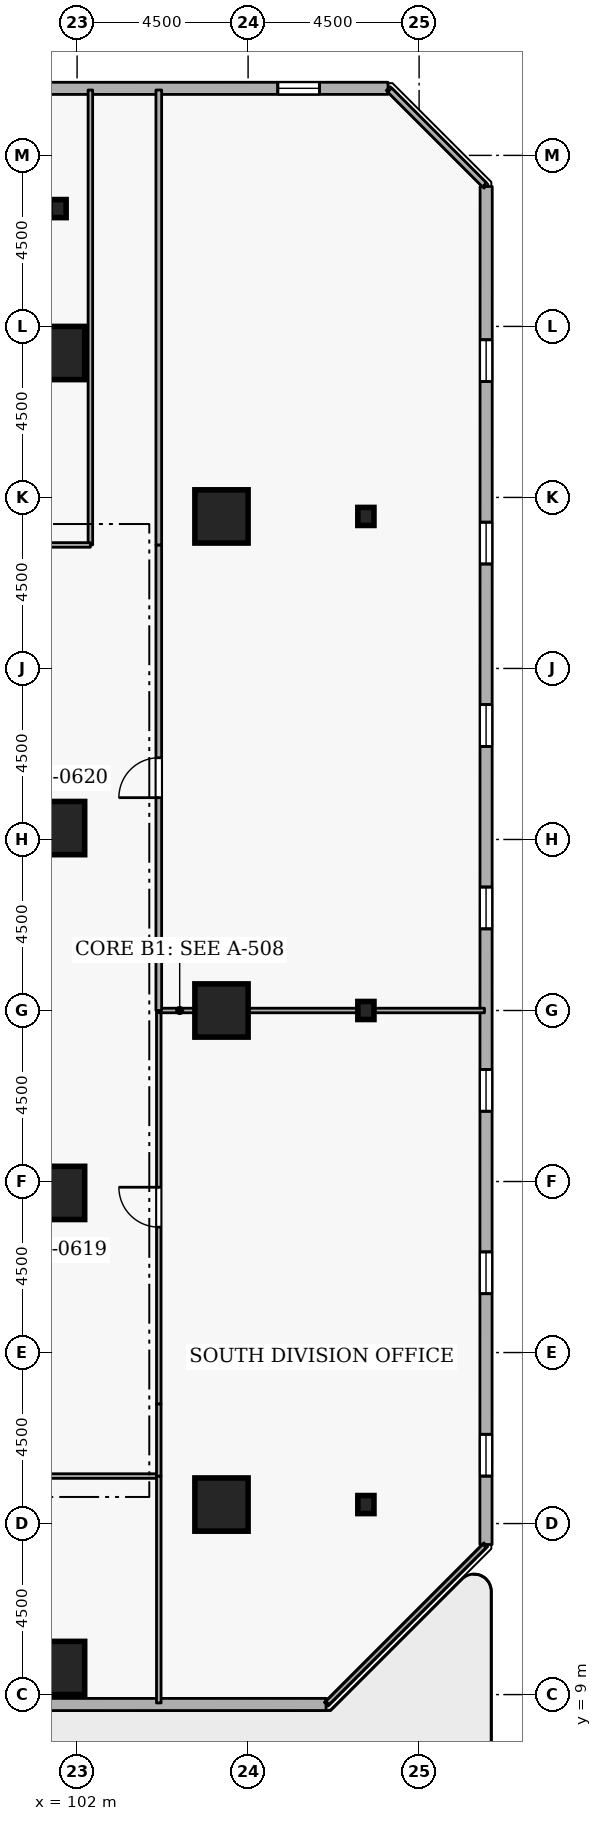
"""IFC4 building model, lengths in metres.
Left out: names, types, materials, properties, quantities, classifications, styles, units other than length and angle.
Written with IfcOpenShell. Run it as: python <this file> out.ifc"""

import sys

from ifc_helpers import new_model, si_unit, direction, frame, frame_2d, origin, origin_2d, place, context, subcontext, project, spatial, rectangle, i_section, extrude, element, fill, save


model = new_model("IFC4")
c1 = context("Model", 3, precision=1e-05, world=origin(), true_north=direction((0.0, 1.0)))
c2 = subcontext(c1, "Body", "Model", "MODEL_VIEW")
j1 = project(units=[si_unit("LENGTHUNIT", "METRE"), si_unit("PLANEANGLEUNIT", "RADIAN")], contexts=[c1])
p1 = place(None, origin())
s1 = spatial("IfcSite", under=j1, at=p1, CompositionType="ELEMENT")
p2 = place(p1, origin())
s2 = spatial("IfcBuilding", under=s1, at=p2, CompositionType="ELEMENT")
p3 = place(p2, frame((0.0, 0.0, 49.5)))
s3 = spatial("IfcBuildingStorey", under=s2, at=p3, CompositionType="ELEMENT", Elevation=49.5)
for number, where, z_axis, x_axis in (
    (1, (105.8, 14.0, 0.0), (0.0, 0.0, 1.0), (1.0, 0.0, 0.0)),
    (2, (105.8, 27.0, 0.0), (0.0, 0.0, 1.0), (1.0, 0.0, 0.0)),
    (3, (105.8, 40.0, 0.0), (0.0, 0.0, 1.0), (1.0, 0.0, 0.0)),
    (4, (101.5, 44.3, 0.0), (0.0, 0.0, 1.0), (1.0, 0.0, 0.0)),
    (5, (101.5, 9.7, 0.0), (0.0, 0.0, 1.0), (1.0, 0.0, 0.0)),
    (6, (101.5, 22.2, 0.0), (0.0, 0.0, 1.0), (1.0, 0.0, 0.0)),
    (7, (101.5, 31.8, 0.0), (0.0, 0.0, 1.0), (1.0, 0.0, 0.0)),
):
    element("IfcColumn", number, at=place(p3, frame(where, z_axis=z_axis, x_axis=x_axis)), inside=s3, PredefinedType="COLUMN", context=c2, shape_type="SweptSolid", body=[
        extrude(rectangle(XDim=1.4, YDim=1.4, at=origin_2d()), origin(), (0.0, 0.0, 1.0), 4.2),
    ])
for number, where, z_axis, x_axis in (
    (8, (109.6, 14.0, 0.0), (0.0, 0.0, 1.0), (1.0, 0.0, 0.0)),
    (9, (109.6, 27.0, 0.0), (0.0, 0.0, 1.0), (1.0, 0.0, 0.0)),
    (10, (109.6, 40.0, 0.0), (0.0, 0.0, 1.0), (1.0, 0.0, 0.0)),
    (11, (101.5, 48.1, 0.0), (0.0, 0.0, 1.0), (1.0, 0.0, 0.0)),
):
    element("IfcColumn", number, at=place(p3, frame(where, z_axis=z_axis, x_axis=x_axis)), inside=s3, PredefinedType="COLUMN", context=c2, shape_type="SweptSolid", body=[
        extrude(i_section(OverallWidth=0.424, OverallDepth=0.475, WebThickness=0.048, FlangeThickness=0.077, FilletRadius=0.015, at=origin_2d()), origin(), (0.0, 0.0, 1.0), 4.2),
    ])
p4 = place(p3, frame((72.819, 8.735, 0.0), z_axis=(0.0, 0.0, 1.0), x_axis=(0.999999988703, 0.000150313265, 0.0)))
e12 = element("IfcWall", 12, at=p4, inside=s3, PredefinedType="STANDARD", context=c2, shape_type="SweptSolid", body=[
    extrude(rectangle(XDim=35.733, YDim=0.32, at=frame_2d((17.866, 0.0))), origin(), (0.0, 0.0, 1.0), 3.3),
])
p5 = place(p4, frame((19.591, 0.0, 0.0)))
e13 = element("IfcOpeningElement", 13, at=p5, cuts=e12, PredefinedType="OPENING", context=c2, shape_type="SweptSolid", body=[
    extrude(rectangle(XDim=1.15, YDim=2.1, at=frame_2d((0.575, 1.05))), frame((0.0, 0.17, 0.0), z_axis=(0.0, -1.0, 0.0), x_axis=(1.0, 0.0, 0.0)), (0.0, 0.0, 1.0), 0.34),
])
p6 = place(p4, frame((6.6, 0.0, 0.72)))
e14 = element("IfcOpeningElement", 14, at=p6, cuts=e12, PredefinedType="OPENING", context=c2, shape_type="SweptSolid", body=[
    extrude(rectangle(XDim=1.1, YDim=1.8, at=frame_2d((0.55, 0.9))), frame((0.0, 0.17, 0.0), z_axis=(0.0, -1.0, 0.0), x_axis=(1.0, 0.0, 0.0)), (0.0, 0.0, 1.0), 0.34),
])
p7 = place(p4, frame((11.4, 0.0, 0.72)))
e15 = element("IfcOpeningElement", 15, at=p7, cuts=e12, PredefinedType="OPENING", context=c2, shape_type="SweptSolid", body=[
    extrude(rectangle(XDim=1.1, YDim=1.8, at=frame_2d((0.55, 0.9))), frame((0.0, 0.17, 0.0), z_axis=(0.0, -1.0, 0.0), x_axis=(1.0, 0.0, 0.0)), (0.0, 0.0, 1.0), 0.34),
])
p8 = place(p4, frame((25.8, 0.0, 0.72)))
e16 = element("IfcOpeningElement", 16, at=p8, cuts=e12, PredefinedType="OPENING", context=c2, shape_type="SweptSolid", body=[
    extrude(rectangle(XDim=1.1, YDim=1.8, at=frame_2d((0.55, 0.9))), frame((0.0, 0.17, 0.0), z_axis=(0.0, -1.0, 0.0), x_axis=(1.0, 0.0, 0.0)), (0.0, 0.0, 1.0), 0.34),
])
p9 = place(p3, frame((112.76, 12.948, 0.0), z_axis=(0.0, 0.0, 1.0), x_axis=(0.000150313265, 0.999999988703, 0.0)))
e17 = element("IfcWall", 17, at=p9, inside=s3, PredefinedType="STANDARD", context=c2, shape_type="SweptSolid", body=[
    extrude(rectangle(XDim=35.733, YDim=0.32, at=frame_2d((17.866, 0.0))), origin(), (0.0, 0.0, 1.0), 3.3),
])
p10 = place(p9, frame((1.8, 0.0, 0.72)))
e18 = element("IfcOpeningElement", 18, at=p10, cuts=e17, PredefinedType="OPENING", context=c2, shape_type="SweptSolid", body=[
    extrude(rectangle(XDim=1.1, YDim=1.8, at=frame_2d((0.55, 0.9))), frame((0.0, 0.17, 0.0), z_axis=(0.0, -1.0, 0.0), x_axis=(1.0, 0.0, 0.0)), (0.0, 0.0, 1.0), 0.34),
])
p11 = place(p9, frame((6.6, 0.0, 0.72)))
e19 = element("IfcOpeningElement", 19, at=p11, cuts=e17, PredefinedType="OPENING", context=c2, shape_type="SweptSolid", body=[
    extrude(rectangle(XDim=1.1, YDim=1.8, at=frame_2d((0.55, 0.9))), frame((0.0, 0.17, 0.0), z_axis=(0.0, -1.0, 0.0), x_axis=(1.0, 0.0, 0.0)), (0.0, 0.0, 1.0), 0.34),
])
p12 = place(p9, frame((11.4, 0.0, 0.72)))
e20 = element("IfcOpeningElement", 20, at=p12, cuts=e17, PredefinedType="OPENING", context=c2, shape_type="SweptSolid", body=[
    extrude(rectangle(XDim=1.1, YDim=1.8, at=frame_2d((0.55, 0.9))), frame((0.0, 0.17, 0.0), z_axis=(0.0, -1.0, 0.0), x_axis=(1.0, 0.0, 0.0)), (0.0, 0.0, 1.0), 0.34),
])
p13 = place(p9, frame((16.2, 0.0, 0.72)))
e21 = element("IfcOpeningElement", 21, at=p13, cuts=e17, PredefinedType="OPENING", context=c2, shape_type="SweptSolid", body=[
    extrude(rectangle(XDim=1.1, YDim=1.8, at=frame_2d((0.55, 0.9))), frame((0.0, 0.17, 0.0), z_axis=(0.0, -1.0, 0.0), x_axis=(1.0, 0.0, 0.0)), (0.0, 0.0, 1.0), 0.34),
])
p14 = place(p9, frame((21.0, 0.0, 0.72)))
e22 = element("IfcOpeningElement", 22, at=p14, cuts=e17, PredefinedType="OPENING", context=c2, shape_type="SweptSolid", body=[
    extrude(rectangle(XDim=1.1, YDim=1.8, at=frame_2d((0.55, 0.9))), frame((0.0, 0.17, 0.0), z_axis=(0.0, -1.0, 0.0), x_axis=(1.0, 0.0, 0.0)), (0.0, 0.0, 1.0), 0.34),
])
p15 = place(p9, frame((25.8, 0.0, 0.72)))
e23 = element("IfcOpeningElement", 23, at=p15, cuts=e17, PredefinedType="OPENING", context=c2, shape_type="SweptSolid", body=[
    extrude(rectangle(XDim=1.1, YDim=1.8, at=frame_2d((0.55, 0.9))), frame((0.0, 0.17, 0.0), z_axis=(0.0, -1.0, 0.0), x_axis=(1.0, 0.0, 0.0)), (0.0, 0.0, 1.0), 0.34),
])
p16 = place(p9, frame((30.6, 0.0, 0.72)))
e24 = element("IfcOpeningElement", 24, at=p16, cuts=e17, PredefinedType="OPENING", context=c2, shape_type="SweptSolid", body=[
    extrude(rectangle(XDim=1.1, YDim=1.8, at=frame_2d((0.55, 0.9))), frame((0.0, 0.17, 0.0), z_axis=(0.0, -1.0, 0.0), x_axis=(1.0, 0.0, 0.0)), (0.0, 0.0, 1.0), 0.34),
])
p17 = place(p3, frame((110.181, 51.265, 0.0), z_axis=(0.0, 0.0, 1.0), x_axis=(-0.999999988703, -0.000150313265, 0.0)))
e25 = element("IfcWall", 25, at=p17, inside=s3, PredefinedType="STANDARD", context=c2, shape_type="SweptSolid", body=[
    extrude(rectangle(XDim=35.733, YDim=0.32, at=frame_2d((17.866, 0.0))), origin(), (0.0, 0.0, 1.0), 3.3),
])
p18 = place(p17, frame((1.8, 0.0, 0.72)))
e26 = element("IfcOpeningElement", 26, at=p18, cuts=e25, PredefinedType="OPENING", context=c2, shape_type="SweptSolid", body=[
    extrude(rectangle(XDim=1.1, YDim=1.8, at=frame_2d((0.55, 0.9))), frame((0.0, 0.17, 0.0), z_axis=(0.0, -1.0, 0.0), x_axis=(1.0, 0.0, 0.0)), (0.0, 0.0, 1.0), 0.34),
])
p19 = place(p17, frame((11.4, 0.0, 0.72)))
e27 = element("IfcOpeningElement", 27, at=p19, cuts=e25, PredefinedType="OPENING", context=c2, shape_type="SweptSolid", body=[
    extrude(rectangle(XDim=1.1, YDim=1.8, at=frame_2d((0.55, 0.9))), frame((0.0, 0.17, 0.0), z_axis=(0.0, -1.0, 0.0), x_axis=(1.0, 0.0, 0.0)), (0.0, 0.0, 1.0), 0.34),
])
p20 = place(p17, frame((16.2, 0.0, 0.72)))
e28 = element("IfcOpeningElement", 28, at=p20, cuts=e25, PredefinedType="OPENING", context=c2, shape_type="SweptSolid", body=[
    extrude(rectangle(XDim=1.1, YDim=1.8, at=frame_2d((0.55, 0.9))), frame((0.0, 0.17, 0.0), z_axis=(0.0, -1.0, 0.0), x_axis=(1.0, 0.0, 0.0)), (0.0, 0.0, 1.0), 0.34),
])
p21 = place(p17, frame((25.8, 0.0, 0.72)))
e29 = element("IfcOpeningElement", 29, at=p21, cuts=e25, PredefinedType="OPENING", context=c2, shape_type="SweptSolid", body=[
    extrude(rectangle(XDim=1.1, YDim=1.8, at=frame_2d((0.55, 0.9))), frame((0.0, 0.17, 0.0), z_axis=(0.0, -1.0, 0.0), x_axis=(1.0, 0.0, 0.0)), (0.0, 0.0, 1.0), 0.34),
])
p22 = place(p17, frame((30.6, 0.0, 0.72)))
e30 = element("IfcOpeningElement", 30, at=p22, cuts=e25, PredefinedType="OPENING", context=c2, shape_type="SweptSolid", body=[
    extrude(rectangle(XDim=1.1, YDim=1.8, at=frame_2d((0.55, 0.9))), frame((0.0, 0.17, 0.0), z_axis=(0.0, -1.0, 0.0), x_axis=(1.0, 0.0, 0.0)), (0.0, 0.0, 1.0), 0.34),
])
p23 = place(p3, frame((94.8, 14.75, 0.0), z_axis=(0.0, 0.0, 1.0), x_axis=(1.0, 0.0, 0.0)))
e31 = element("IfcWall", 31, at=p23, inside=s3, PredefinedType="PARTITIONING", context=c2, shape_type="SweptSolid", body=[
    extrude(rectangle(XDim=9.35, YDim=0.12, at=frame_2d((4.675, 0.0))), origin(), (0.0, 0.0, 1.0), 3.94),
])
p24 = place(p23, frame((4.15, 0.0, 0.0)))
e32 = element("IfcOpeningElement", 32, at=p24, cuts=e31, PredefinedType="OPENING", context=c2, shape_type="SweptSolid", body=[
    extrude(rectangle(XDim=1.05, YDim=2.1, at=frame_2d((0.525, 1.05))), frame((0.0, 0.07, 0.0), z_axis=(0.0, -1.0, 0.0), x_axis=(1.0, 0.0, 0.0)), (0.0, 0.0, 1.0), 0.14),
])
p25 = place(p3, frame((104.15, 14.75, 0.0), z_axis=(0.0, 0.0, 1.0), x_axis=(0.0, -1.0, 0.0)))
e33 = element("IfcWall", 33, at=p25, inside=s3, PredefinedType="PARTITIONING", context=c2, shape_type="SweptSolid", body=[
    extrude(rectangle(XDim=5.97, YDim=0.12, at=frame_2d((2.985, 0.0))), origin(), (0.0, 0.0, 1.0), 3.94),
])
p26 = place(p3, frame((102.35, 51.22, 0.0), z_axis=(0.0, 0.0, 1.0), x_axis=(0.0, -1.0, 0.0)))
e34 = element("IfcWall", 34, at=p26, inside=s3, PredefinedType="PARTITIONING", context=c2, shape_type="SweptSolid", body=[
    extrude(rectangle(XDim=11.97, YDim=0.12, at=frame_2d((5.985, 0.0))), origin(), (0.0, 0.0, 1.0), 3.94),
])
p27 = place(p3, frame((102.35, 39.25, 0.0), z_axis=(0.0, 0.0, 1.0), x_axis=(-1.0, 0.0, 0.0)))
e35 = element("IfcWall", 35, at=p27, inside=s3, PredefinedType="PARTITIONING", context=c2, shape_type="SweptSolid", body=[
    extrude(rectangle(XDim=1.862, YDim=0.12, at=frame_2d((0.931, 0.0))), origin(), (0.0, 0.0, 1.0), 3.94),
])
p28 = place(p3, frame((104.15, 14.75, 0.0), z_axis=(0.0, 0.0, 1.0), x_axis=(0.0, 1.0, 0.0)))
e36 = element("IfcWall", 36, at=p28, inside=s3, PredefinedType="PARTITIONING", context=c2, shape_type="SweptSolid", body=[
    extrude(rectangle(XDim=1.9, YDim=0.12, at=frame_2d((0.95, 0.0))), origin(), (0.0, 0.0, 1.0), 3.94),
])
p29 = place(p3, frame((104.15, 16.65, 0.0), z_axis=(0.0, 0.0, 1.0), x_axis=(0.0, 1.0, 0.0)))
e37 = element("IfcWall", 37, at=p29, inside=s3, PredefinedType="PARTITIONING", context=c2, shape_type="SweptSolid", body=[
    extrude(rectangle(XDim=10.35, YDim=0.12, at=frame_2d((5.175, 0.0))), origin(), (0.0, 0.0, 1.0), 3.94),
])
p30 = place(p29, frame((4.65, 0.0, 0.0)))
e38 = element("IfcOpeningElement", 38, at=p30, cuts=e37, PredefinedType="OPENING", context=c2, shape_type="SweptSolid", body=[
    extrude(rectangle(XDim=1.05, YDim=2.1, at=frame_2d((0.525, 1.05))), frame((0.0, 0.07, 0.0), z_axis=(0.0, -1.0, 0.0), x_axis=(1.0, 0.0, 0.0)), (0.0, 0.0, 1.0), 0.14),
])
p31 = place(p3, frame((104.15, 27.0, 0.0), z_axis=(0.0, 0.0, 1.0), x_axis=(1.0, 0.0, 0.0)))
e39 = element("IfcWall", 39, at=p31, inside=s3, PredefinedType="PARTITIONING", context=c2, shape_type="SweptSolid", body=[
    extrude(rectangle(XDim=8.57, YDim=0.12, at=frame_2d((4.285, 0.0))), origin(), (0.0, 0.0, 1.0), 3.532),
])
p32 = place(p3, frame((112.72, 12.911, 0.0), z_axis=(0.0, 0.0, 1.0), x_axis=(-0.707106781187, -0.707106781187, 0.0)))
e40 = element("IfcWall", 40, at=p32, inside=s3, PredefinedType="PARTITIONING", context=c2, shape_type="SweptSolid", body=[
    extrude(rectangle(XDim=5.842, YDim=0.12, at=frame_2d((2.921, 0.0))), origin(), (0.0, 0.0, 1.0), 3.94),
])
p33 = place(p3, frame((104.15, 27.0, 0.0), z_axis=(0.0, 0.0, 1.0), x_axis=(0.0, 1.0, 0.0)))
e41 = element("IfcWall", 41, at=p33, inside=s3, PredefinedType="PARTITIONING", context=c2, shape_type="SweptSolid", body=[
    extrude(rectangle(XDim=12.25, YDim=0.15, at=frame_2d((6.125, 0.0))), origin(), (0.0, 0.0, 1.0), 3.94),
])
p34 = place(p33, frame((5.6, 0.0, 0.0)))
e42 = element("IfcOpeningElement", 42, at=p34, cuts=e41, PredefinedType="OPENING", context=c2, shape_type="SweptSolid", body=[
    extrude(rectangle(XDim=1.05, YDim=2.1, at=frame_2d((0.525, 1.05))), frame((0.0, 0.085, 0.0), z_axis=(0.0, -1.0, 0.0), x_axis=(1.0, 0.0, 0.0)), (0.0, 0.0, 1.0), 0.17),
])
p35 = place(p3, frame((104.15, 39.25, 0.0), z_axis=(0.0, 0.0, 1.0), x_axis=(0.0, 1.0, 0.0)))
e43 = element("IfcWall", 43, at=p35, inside=s3, PredefinedType="PARTITIONING", context=c2, shape_type="SweptSolid", body=[
    extrude(rectangle(XDim=11.97, YDim=0.15, at=frame_2d((5.985, 0.0))), origin(), (0.0, 0.0, 1.0), 3.94),
])
p36 = place(p3, frame((110.225, 51.22, 0.0), z_axis=(0.0, 0.0, 1.0), x_axis=(0.707106781187, -0.707106781187, 0.0)))
e44 = element("IfcWall", 44, at=p36, inside=s3, PredefinedType="PARTITIONING", context=c2, shape_type="SweptSolid", body=[
    extrude(rectangle(XDim=3.528, YDim=0.15, at=frame_2d((1.764, 0.0))), origin(), (0.0, 0.0, 1.0), 3.94),
])
p37 = place(p10, origin())
e45 = element("IfcWindow", 45, at=p37, inside=s3, PartitioningType="SINGLE_PANEL", PredefinedType="WINDOW", context=c2, shape_type="SweptSolid", body=[
    extrude(rectangle(XDim=1.1, YDim=1.8, at=frame_2d((0.55, 0.9))), frame((0.0, 0.03, 0.0), z_axis=(0.0, -1.0, 0.0), x_axis=(1.0, 0.0, 0.0)), (0.0, 0.0, 1.0), 0.06),
])
fill(e18, e45)
p38 = place(p11, origin())
e46 = element("IfcWindow", 46, at=p38, inside=s3, PartitioningType="SINGLE_PANEL", PredefinedType="WINDOW", context=c2, shape_type="SweptSolid", body=[
    extrude(rectangle(XDim=1.1, YDim=1.8, at=frame_2d((0.55, 0.9))), frame((0.0, 0.03, 0.0), z_axis=(0.0, -1.0, 0.0), x_axis=(1.0, 0.0, 0.0)), (0.0, 0.0, 1.0), 0.06),
])
fill(e19, e46)
p39 = place(p12, origin())
e47 = element("IfcWindow", 47, at=p39, inside=s3, PartitioningType="SINGLE_PANEL", PredefinedType="WINDOW", context=c2, shape_type="SweptSolid", body=[
    extrude(rectangle(XDim=1.1, YDim=1.8, at=frame_2d((0.55, 0.9))), frame((0.0, 0.03, 0.0), z_axis=(0.0, -1.0, 0.0), x_axis=(1.0, 0.0, 0.0)), (0.0, 0.0, 1.0), 0.06),
])
fill(e20, e47)
p40 = place(p13, origin())
e48 = element("IfcWindow", 48, at=p40, inside=s3, PartitioningType="SINGLE_PANEL", PredefinedType="WINDOW", context=c2, shape_type="SweptSolid", body=[
    extrude(rectangle(XDim=1.1, YDim=1.8, at=frame_2d((0.55, 0.9))), frame((0.0, 0.03, 0.0), z_axis=(0.0, -1.0, 0.0), x_axis=(1.0, 0.0, 0.0)), (0.0, 0.0, 1.0), 0.06),
])
fill(e21, e48)
p41 = place(p14, origin())
e49 = element("IfcWindow", 49, at=p41, inside=s3, PartitioningType="SINGLE_PANEL", PredefinedType="WINDOW", context=c2, shape_type="SweptSolid", body=[
    extrude(rectangle(XDim=1.1, YDim=1.8, at=frame_2d((0.55, 0.9))), frame((0.0, 0.03, 0.0), z_axis=(0.0, -1.0, 0.0), x_axis=(1.0, 0.0, 0.0)), (0.0, 0.0, 1.0), 0.06),
])
fill(e22, e49)
p42 = place(p15, origin())
e50 = element("IfcWindow", 50, at=p42, inside=s3, PartitioningType="SINGLE_PANEL", PredefinedType="WINDOW", context=c2, shape_type="SweptSolid", body=[
    extrude(rectangle(XDim=1.1, YDim=1.8, at=frame_2d((0.55, 0.9))), frame((0.0, 0.03, 0.0), z_axis=(0.0, -1.0, 0.0), x_axis=(1.0, 0.0, 0.0)), (0.0, 0.0, 1.0), 0.06),
])
fill(e23, e50)
p43 = place(p16, origin())
e51 = element("IfcWindow", 51, at=p43, inside=s3, PartitioningType="SINGLE_PANEL", PredefinedType="WINDOW", context=c2, shape_type="SweptSolid", body=[
    extrude(rectangle(XDim=1.1, YDim=1.8, at=frame_2d((0.55, 0.9))), frame((0.0, 0.03, 0.0), z_axis=(0.0, -1.0, 0.0), x_axis=(1.0, 0.0, 0.0)), (0.0, 0.0, 1.0), 0.06),
])
fill(e24, e51)
p44 = place(p18, origin())
e52 = element("IfcWindow", 52, at=p44, inside=s3, PartitioningType="SINGLE_PANEL", PredefinedType="WINDOW", context=c2, shape_type="SweptSolid", body=[
    extrude(rectangle(XDim=1.1, YDim=1.8, at=frame_2d((0.55, 0.9))), frame((0.0, 0.03, 0.0), z_axis=(0.0, -1.0, 0.0), x_axis=(1.0, 0.0, 0.0)), (0.0, 0.0, 1.0), 0.06),
])
fill(e26, e52)
p45 = place(p30, origin())
e53 = element("IfcDoor", 53, at=p45, inside=s3, OperationType="SINGLE_SWING_RIGHT", PredefinedType="DOOR", context=c2, shape_type="SweptSolid", body=[
    extrude(rectangle(XDim=1.05, YDim=2.1, at=frame_2d((0.525, 1.05))), frame((0.0, 0.025, 0.0), z_axis=(0.0, -1.0, 0.0), x_axis=(1.0, 0.0, 0.0)), (0.0, 0.0, 1.0), 0.05),
])
fill(e38, e53)
p46 = place(p34, origin())
e54 = element("IfcDoor", 54, at=p46, inside=s3, OperationType="SINGLE_SWING_LEFT", PredefinedType="DOOR", context=c2, shape_type="SweptSolid", body=[
    extrude(rectangle(XDim=1.05, YDim=2.1, at=frame_2d((0.525, 1.05))), frame((0.0, 0.025, 0.0), z_axis=(0.0, -1.0, 0.0), x_axis=(1.0, 0.0, 0.0)), (0.0, 0.0, 1.0), 0.05),
])
fill(e42, e54)
save(model, sys.argv[1])
